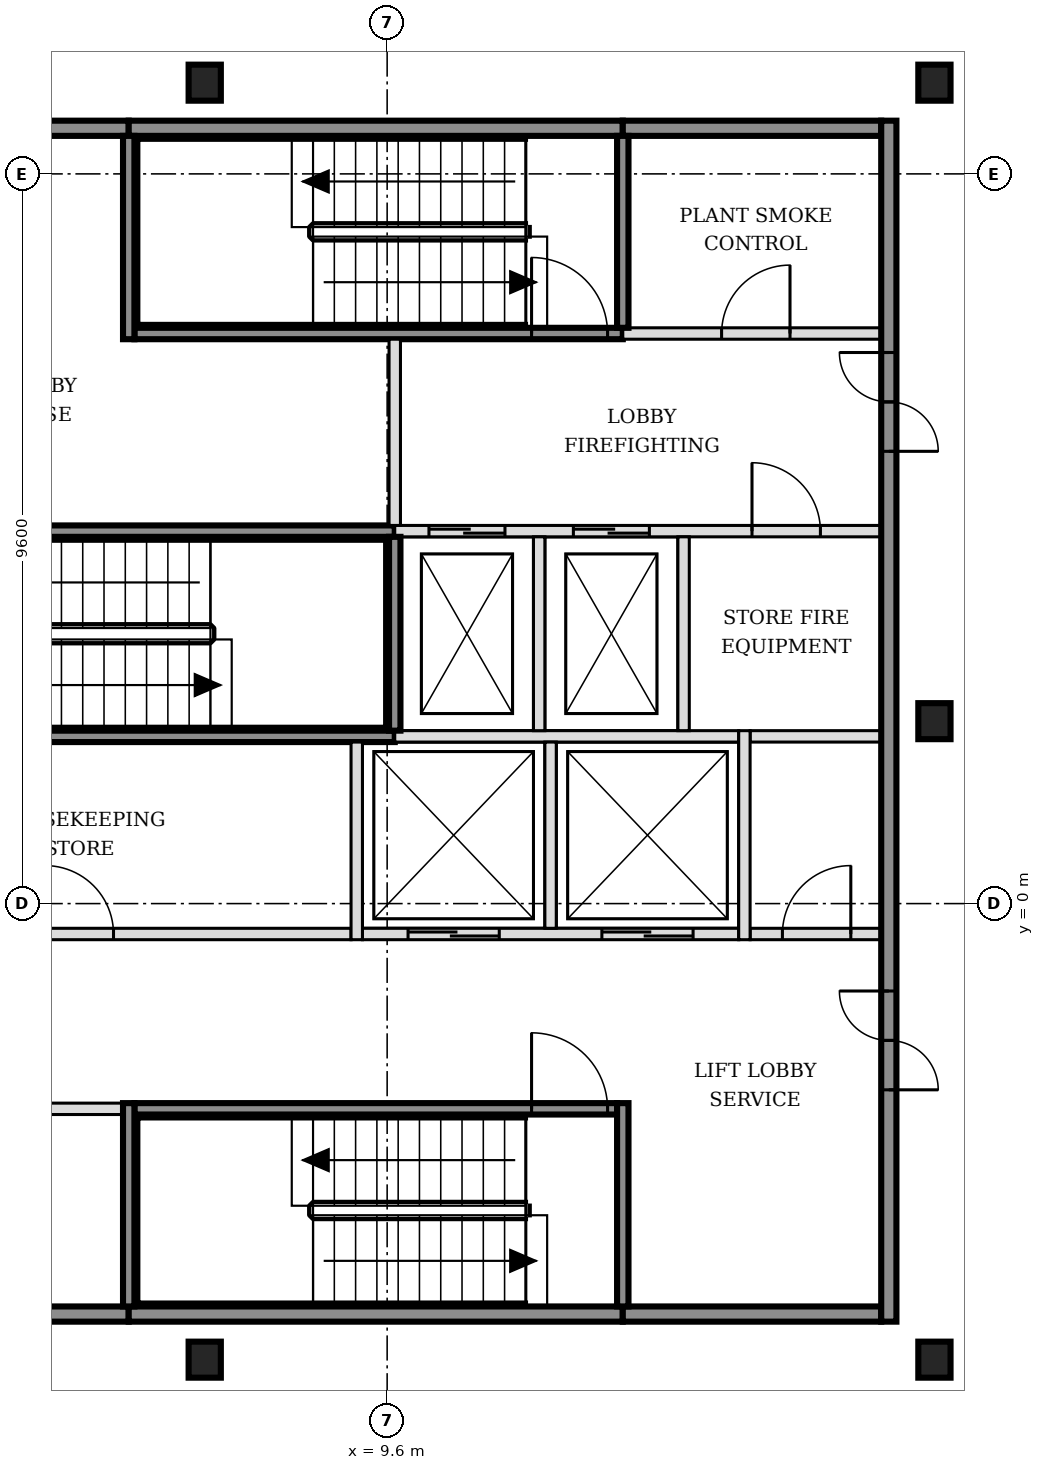
"""IFC4 building model, lengths in metres.
Left out: names, types, materials, properties, quantities, classifications, styles, units other than length and angle.
Written with IfcOpenShell. Run it as: python <this file> out.ifc"""

import sys

from ifc_helpers import new_model, si_unit, direction, frame, frame_2d, origin, origin_2d, place, context, subcontext, project, spatial, rectangle, i_section, extrude, element, fill, save


model = new_model("IFC4")
c1 = context("Model", 3, precision=1e-05, world=origin(), true_north=direction((0.0, 1.0)))
c2 = subcontext(c1, "Body", "Model", "MODEL_VIEW")
j1 = project(units=[si_unit("LENGTHUNIT", "METRE"), si_unit("PLANEANGLEUNIT", "RADIAN")], contexts=[c1])
p1 = place(None, origin())
s1 = spatial("IfcSite", under=j1, at=p1, CompositionType="ELEMENT")
p2 = place(p1, origin())
s2 = spatial("IfcBuilding", under=s1, at=p2, CompositionType="ELEMENT")
p3 = place(p2, frame((0.0, 0.0, 139.8)))
s3 = spatial("IfcBuildingStorey", under=s2, at=p3, CompositionType="ELEMENT", Elevation=139.8)
for number, where, z_axis, x_axis in (
    (1, (7.2, -6.0, -0.15), (0.0, 0.0, 1.0), (1.0, 0.0, 0.0)),
    (2, (16.8, -6.0, -0.15), (0.0, 0.0, 1.0), (1.0, 0.0, 0.0)),
    (3, (16.8, 2.4, -0.15), (0.0, 0.0, 1.0), (1.0, 0.0, 0.0)),
    (4, (7.2, 10.8, -0.15), (0.0, 0.0, 1.0), (1.0, 0.0, 0.0)),
    (5, (16.8, 10.8, -0.15), (0.0, 0.0, 1.0), (1.0, 0.0, 0.0)),
):
    element("IfcColumn", number, at=place(p3, frame(where, z_axis=z_axis, x_axis=x_axis)), inside=s3, PredefinedType="COLUMN", context=c2, shape_type="SweptSolid", body=[
        extrude(i_section(OverallWidth=0.424, OverallDepth=0.474, WebThickness=0.048, FlangeThickness=0.077, FilletRadius=0.015, at=origin_2d()), origin(), (0.0, 0.0, 1.0), 3.6),
    ])
p4 = place(p3, frame((-1.7, -5.4, 0.0), z_axis=(0.0, 0.0, 1.0), x_axis=(1.0, 0.0, 0.0)))
e6 = element("IfcWall", 6, at=p4, inside=s3, PredefinedType="SOLIDWALL", context=c2, shape_type="SweptSolid", body=[
    extrude(rectangle(XDim=7.9, YDim=0.2, at=frame_2d((3.95, 0.0))), origin(), (0.0, 0.0, 1.0), 3.45),
])
p5 = place(p3, frame((6.2, -5.4, 0.0), z_axis=(0.0, 0.0, 1.0), x_axis=(1.0, 0.0, 0.0)))
e7 = element("IfcWall", 7, at=p5, inside=s3, PredefinedType="SOLIDWALL", context=c2, shape_type="SweptSolid", body=[
    extrude(rectangle(XDim=6.5, YDim=0.2, at=frame_2d((3.25, 0.0))), origin(), (0.0, 0.0, 1.0), 3.45),
])
p6 = place(p3, frame((12.7, -5.4, 0.0), z_axis=(0.0, 0.0, 1.0), x_axis=(1.0, 0.0, 0.0)))
e8 = element("IfcWall", 8, at=p6, inside=s3, PredefinedType="SOLIDWALL", context=c2, shape_type="SweptSolid", body=[
    extrude(rectangle(XDim=3.4, YDim=0.2, at=frame_2d((1.7, 0.0))), origin(), (0.0, 0.0, 1.0), 3.45),
])
p7 = place(p3, frame((-1.7, -2.7, 0.0), z_axis=(0.0, 0.0, 1.0), x_axis=(1.0, 0.0, 0.0)))
e9 = element("IfcWall", 9, at=p7, inside=s3, PredefinedType="PARTITIONING", context=c2, shape_type="SweptSolid", body=[
    extrude(rectangle(XDim=7.825, YDim=0.15, at=frame_2d((3.913, 0.0))), origin(), (0.0, 0.0, 1.0), 3.45),
])
p8 = place(p7, frame((3.45, 0.0, 0.0)))
e10 = element("IfcOpeningElement", 10, at=p8, cuts=e9, PredefinedType="OPENING", context=c2, shape_type="SweptSolid", body=[
    extrude(rectangle(XDim=0.9, YDim=2.1, at=frame_2d((0.45, 1.05))), frame((0.0, 0.085, 0.0), z_axis=(0.0, -1.0, 0.0), x_axis=(1.0, 0.0, 0.0)), (0.0, 0.0, 1.0), 0.17),
])
p9 = place(p3, frame((6.275, -2.7, 0.0), z_axis=(0.0, 0.0, 1.0), x_axis=(1.0, 0.0, 0.0)))
e11 = element("IfcWall", 11, at=p9, inside=s3, PredefinedType="SOLIDWALL", context=c2, shape_type="SweptSolid", body=[
    extrude(rectangle(XDim=6.35, YDim=0.15, at=frame_2d((3.175, 0.0))), origin(), (0.0, 0.0, 1.0), 3.45),
])
p10 = place(p9, frame((5.225, 0.0, 0.0)))
e12 = element("IfcOpeningElement", 12, at=p10, cuts=e11, PredefinedType="OPENING", context=c2, shape_type="SweptSolid", body=[
    extrude(rectangle(XDim=1.0, YDim=2.1, at=frame_2d((0.5, 1.05))), frame((0.0, 0.085, 0.0), z_axis=(0.0, -1.0, 0.0), x_axis=(1.0, 0.0, 0.0)), (0.0, 0.0, 1.0), 0.17),
])
p11 = place(p3, frame((-1.7, -0.4, 0.0), z_axis=(0.0, 0.0, 1.0), x_axis=(1.0, 0.0, 0.0)))
e13 = element("IfcWall", 13, at=p11, inside=s3, PredefinedType="PARTITIONING", context=c2, shape_type="SweptSolid", body=[
    extrude(rectangle(XDim=10.825, YDim=0.15, at=frame_2d((5.413, 0.0))), origin(), (0.0, 0.0, 1.0), 3.45),
])
p12 = place(p11, frame((1.3, 0.0, 0.0)))
e14 = element("IfcOpeningElement", 14, at=p12, cuts=e13, PredefinedType="OPENING", context=c2, shape_type="SweptSolid", body=[
    extrude(rectangle(XDim=0.9, YDim=2.1, at=frame_2d((0.45, 1.05))), frame((0.0, 0.085, 0.0), z_axis=(0.0, -1.0, 0.0), x_axis=(1.0, 0.0, 0.0)), (0.0, 0.0, 1.0), 0.17),
])
p13 = place(p11, frame((6.8, 0.0, 0.0)))
e15 = element("IfcOpeningElement", 15, at=p13, cuts=e13, PredefinedType="OPENING", context=c2, shape_type="SweptSolid", body=[
    extrude(rectangle(XDim=0.9, YDim=2.1, at=frame_2d((0.45, 1.05))), frame((0.0, 0.085, 0.0), z_axis=(0.0, -1.0, 0.0), x_axis=(1.0, 0.0, 0.0)), (0.0, 0.0, 1.0), 0.17),
])
p14 = place(p3, frame((9.275, -0.4, 0.0), z_axis=(0.0, 0.0, 1.0), x_axis=(1.0, 0.0, 0.0)))
e16 = element("IfcWall", 16, at=p14, inside=s3, PredefinedType="SOLIDWALL", context=c2, shape_type="SweptSolid", body=[
    extrude(rectangle(XDim=4.95, YDim=0.15, at=frame_2d((2.475, 0.0))), origin(), (0.0, 0.0, 1.0), 3.45),
])
p15 = place(p14, frame((0.6, 0.0, 0.0)))
e17 = element("IfcOpeningElement", 17, at=p15, cuts=e16, PredefinedType="OPENING", context=c2, shape_type="SweptSolid", body=[
    extrude(rectangle(XDim=1.2, YDim=2.1, at=frame_2d((0.6, 1.05))), frame((0.0, 0.085, 0.0), z_axis=(0.0, -1.0, 0.0), x_axis=(1.0, 0.0, 0.0)), (0.0, 0.0, 1.0), 0.17),
])
p16 = place(p14, frame((3.15, 0.0, 0.0)))
e18 = element("IfcOpeningElement", 18, at=p16, cuts=e16, PredefinedType="OPENING", context=c2, shape_type="SweptSolid", body=[
    extrude(rectangle(XDim=1.2, YDim=2.1, at=frame_2d((0.6, 1.05))), frame((0.0, 0.085, 0.0), z_axis=(0.0, -1.0, 0.0), x_axis=(1.0, 0.0, 0.0)), (0.0, 0.0, 1.0), 0.17),
])
p17 = place(p3, frame((14.375, -0.4, 0.0), z_axis=(0.0, 0.0, 1.0), x_axis=(1.0, 0.0, 0.0)))
e19 = element("IfcWall", 19, at=p17, inside=s3, PredefinedType="PARTITIONING", context=c2, shape_type="SweptSolid", body=[
    extrude(rectangle(XDim=1.725, YDim=0.15, at=frame_2d((0.863, 0.0))), origin(), (0.0, 0.0, 1.0), 3.45),
])
p18 = place(p17, frame((0.425, 0.0, 0.0)))
e20 = element("IfcOpeningElement", 20, at=p18, cuts=e19, PredefinedType="OPENING", context=c2, shape_type="SweptSolid", body=[
    extrude(rectangle(XDim=0.9, YDim=2.1, at=frame_2d((0.45, 1.05))), frame((0.0, 0.085, 0.0), z_axis=(0.0, -1.0, 0.0), x_axis=(1.0, 0.0, 0.0)), (0.0, 0.0, 1.0), 0.17),
])
p19 = place(p3, frame((3.2, 2.2, 0.0), z_axis=(0.0, 0.0, 1.0), x_axis=(1.0, 0.0, 0.0)))
e21 = element("IfcWall", 21, at=p19, inside=s3, PredefinedType="SOLIDWALL", context=c2, shape_type="SweptSolid", body=[
    extrude(rectangle(XDim=6.5, YDim=0.15, at=frame_2d((3.25, 0.0))), origin(), (0.0, 0.0, 1.0), 3.45),
])
p20 = place(p3, frame((9.7, 2.2, 0.0), z_axis=(0.0, 0.0, 1.0), x_axis=(1.0, 0.0, 0.0)))
e22 = element("IfcWall", 22, at=p20, inside=s3, PredefinedType="SOLIDWALL", context=c2, shape_type="SweptSolid", body=[
    extrude(rectangle(XDim=4.525, YDim=0.15, at=frame_2d((2.263, 0.0))), origin(), (0.0, 0.0, 1.0), 3.45),
])
p21 = place(p3, frame((14.375, 2.2, 0.0), z_axis=(0.0, 0.0, 1.0), x_axis=(1.0, 0.0, 0.0)))
e23 = element("IfcWall", 23, at=p21, inside=s3, PredefinedType="PARTITIONING", context=c2, shape_type="SweptSolid", body=[
    extrude(rectangle(XDim=1.725, YDim=0.15, at=frame_2d((0.863, 0.0))), origin(), (0.0, 0.0, 1.0), 3.45),
])
p22 = place(p3, frame((3.2, 4.9, 0.0), z_axis=(0.0, 0.0, 1.0), x_axis=(1.0, 0.0, 0.0)))
e24 = element("IfcWall", 24, at=p22, inside=s3, PredefinedType="SOLIDWALL", context=c2, shape_type="SweptSolid", body=[
    extrude(rectangle(XDim=6.5, YDim=0.15, at=frame_2d((3.25, 0.0))), origin(), (0.0, 0.0, 1.0), 3.45),
])
p23 = place(p22, frame((0.175, 0.0, 0.0)))
e25 = element("IfcOpeningElement", 25, at=p23, cuts=e24, PredefinedType="OPENING", context=c2, shape_type="SweptSolid", body=[
    extrude(rectangle(XDim=1.0, YDim=2.1, at=frame_2d((0.5, 1.05))), frame((0.0, 0.085, 0.0), z_axis=(0.0, -1.0, 0.0), x_axis=(1.0, 0.0, 0.0)), (0.0, 0.0, 1.0), 0.17),
])
p24 = place(p3, frame((9.7, 4.9, 0.0), z_axis=(0.0, 0.0, 1.0), x_axis=(1.0, 0.0, 0.0)))
e26 = element("IfcWall", 26, at=p24, inside=s3, PredefinedType="SOLIDWALL", context=c2, shape_type="SweptSolid", body=[
    extrude(rectangle(XDim=6.4, YDim=0.15, at=frame_2d((3.2, 0.0))), origin(), (0.0, 0.0, 1.0), 3.45),
])
p25 = place(p24, frame((0.45, 0.0, 0.0)))
e27 = element("IfcOpeningElement", 27, at=p25, cuts=e26, PredefinedType="OPENING", context=c2, shape_type="SweptSolid", body=[
    extrude(rectangle(XDim=1.0, YDim=2.1, at=frame_2d((0.5, 1.05))), frame((0.0, 0.085, 0.0), z_axis=(0.0, -1.0, 0.0), x_axis=(1.0, 0.0, 0.0)), (0.0, 0.0, 1.0), 0.17),
])
p26 = place(p24, frame((2.35, 0.0, 0.0)))
e28 = element("IfcOpeningElement", 28, at=p26, cuts=e26, PredefinedType="OPENING", context=c2, shape_type="SweptSolid", body=[
    extrude(rectangle(XDim=1.0, YDim=2.1, at=frame_2d((0.5, 1.05))), frame((0.0, 0.085, 0.0), z_axis=(0.0, -1.0, 0.0), x_axis=(1.0, 0.0, 0.0)), (0.0, 0.0, 1.0), 0.17),
])
p27 = place(p24, frame((4.7, 0.0, 0.0)))
e29 = element("IfcOpeningElement", 29, at=p27, cuts=e26, PredefinedType="OPENING", context=c2, shape_type="SweptSolid", body=[
    extrude(rectangle(XDim=0.9, YDim=2.1, at=frame_2d((0.45, 1.05))), frame((0.0, 0.085, 0.0), z_axis=(0.0, -1.0, 0.0), x_axis=(1.0, 0.0, 0.0)), (0.0, 0.0, 1.0), 0.17),
])
p28 = place(p3, frame((6.275, 7.5, 0.0), z_axis=(0.0, 0.0, 1.0), x_axis=(1.0, 0.0, 0.0)))
e30 = element("IfcWall", 30, at=p28, inside=s3, PredefinedType="SOLIDWALL", context=c2, shape_type="SweptSolid", body=[
    extrude(rectangle(XDim=6.425, YDim=0.15, at=frame_2d((3.212, 0.0))), origin(), (0.0, 0.0, 1.0), 3.45),
])
p29 = place(p28, frame((5.225, 0.0, 0.0)))
e31 = element("IfcOpeningElement", 31, at=p29, cuts=e30, PredefinedType="OPENING", context=c2, shape_type="SweptSolid", body=[
    extrude(rectangle(XDim=1.0, YDim=2.1, at=frame_2d((0.5, 1.05))), frame((0.0, 0.085, 0.0), z_axis=(0.0, -1.0, 0.0), x_axis=(1.0, 0.0, 0.0)), (0.0, 0.0, 1.0), 0.17),
])
p30 = place(p3, frame((12.7, 7.5, 0.0), z_axis=(0.0, 0.0, 1.0), x_axis=(1.0, 0.0, 0.0)))
e32 = element("IfcWall", 32, at=p30, inside=s3, PredefinedType="SOLIDWALL", context=c2, shape_type="SweptSolid", body=[
    extrude(rectangle(XDim=3.4, YDim=0.15, at=frame_2d((1.7, 0.0))), origin(), (0.0, 0.0, 1.0), 3.45),
])
p31 = place(p30, frame((1.3, 0.0, 0.0)))
e33 = element("IfcOpeningElement", 33, at=p31, cuts=e32, PredefinedType="OPENING", context=c2, shape_type="SweptSolid", body=[
    extrude(rectangle(XDim=0.9, YDim=2.1, at=frame_2d((0.45, 1.05))), frame((0.0, 0.085, 0.0), z_axis=(0.0, -1.0, 0.0), x_axis=(1.0, 0.0, 0.0)), (0.0, 0.0, 1.0), 0.17),
])
p32 = place(p3, frame((-1.7, 10.2, 0.0), z_axis=(0.0, 0.0, 1.0), x_axis=(1.0, 0.0, 0.0)))
e34 = element("IfcWall", 34, at=p32, inside=s3, PredefinedType="SOLIDWALL", context=c2, shape_type="SweptSolid", body=[
    extrude(rectangle(XDim=7.9, YDim=0.2, at=frame_2d((3.95, 0.0))), origin(), (0.0, 0.0, 1.0), 3.45),
])
p33 = place(p3, frame((6.2, 10.2, 0.0), z_axis=(0.0, 0.0, 1.0), x_axis=(1.0, 0.0, 0.0)))
e35 = element("IfcWall", 35, at=p33, inside=s3, PredefinedType="SOLIDWALL", context=c2, shape_type="SweptSolid", body=[
    extrude(rectangle(XDim=6.5, YDim=0.2, at=frame_2d((3.25, 0.0))), origin(), (0.0, 0.0, 1.0), 3.45),
])
p34 = place(p3, frame((12.7, 10.2, 0.0), z_axis=(0.0, 0.0, 1.0), x_axis=(1.0, 0.0, 0.0)))
e36 = element("IfcWall", 36, at=p34, inside=s3, PredefinedType="SOLIDWALL", context=c2, shape_type="SweptSolid", body=[
    extrude(rectangle(XDim=3.4, YDim=0.2, at=frame_2d((1.7, 0.0))), origin(), (0.0, 0.0, 1.0), 3.45),
])
for number, where, z_axis, x_axis in (
    (37, (6.2, -5.3, 0.0), (0.0, 0.0, 1.0), (0.0, 1.0, 0.0)),
    (38, (6.2, 7.425, 0.0), (0.0, 0.0, 1.0), (0.0, 1.0, 0.0)),
):
    element("IfcWall", number, at=place(p3, frame(where, z_axis=z_axis, x_axis=x_axis)), inside=s3, PredefinedType="SOLIDWALL", context=c2, shape_type="SweptSolid", body=[
        extrude(rectangle(XDim=2.675, YDim=0.15, at=frame_2d((1.337, 0.0))), origin(), (0.0, 0.0, 1.0), 3.45),
    ])
p35 = place(p3, frame((9.2, -0.475, 0.0), z_axis=(0.0, 0.0, 1.0), x_axis=(0.0, 1.0, 0.0)))
e39 = element("IfcWall", 39, at=p35, inside=s3, PredefinedType="SOLIDWALL", context=c2, shape_type="SweptSolid", body=[
    extrude(rectangle(XDim=2.6, YDim=0.15, at=frame_2d((1.3, 0.0))), origin(), (0.0, 0.0, 1.0), 3.45),
])
p36 = place(p3, frame((9.7, 2.275, 0.0), z_axis=(0.0, 0.0, 1.0), x_axis=(0.0, 1.0, 0.0)))
e40 = element("IfcWall", 40, at=p36, inside=s3, PredefinedType="SOLIDWALL", context=c2, shape_type="SweptSolid", body=[
    extrude(rectangle(XDim=2.55, YDim=0.15, at=frame_2d((1.275, 0.0))), origin(), (0.0, 0.0, 1.0), 3.45),
])
p37 = place(p3, frame((9.7, 4.975, 0.0), z_axis=(0.0, 0.0, 1.0), x_axis=(0.0, 1.0, 0.0)))
e41 = element("IfcWall", 41, at=p37, inside=s3, PredefinedType="SOLIDWALL", context=c2, shape_type="SweptSolid", body=[
    extrude(rectangle(XDim=2.45, YDim=0.15, at=frame_2d((1.225, 0.0))), origin(), (0.0, 0.0, 1.0), 3.45),
])
p38 = place(p3, frame((11.6, 2.275, 0.0), z_axis=(0.0, 0.0, 1.0), x_axis=(0.0, 1.0, 0.0)))
e42 = element("IfcWall", 42, at=p38, inside=s3, PredefinedType="SOLIDWALL", context=c2, shape_type="SweptSolid", body=[
    extrude(rectangle(XDim=2.55, YDim=0.15, at=frame_2d((1.275, 0.0))), origin(), (0.0, 0.0, 1.0), 3.45),
])
p39 = place(p3, frame((11.75, -0.325, 0.0), z_axis=(0.0, 0.0, 1.0), x_axis=(0.0, 1.0, 0.0)))
e43 = element("IfcWall", 43, at=p39, inside=s3, PredefinedType="SOLIDWALL", context=c2, shape_type="SweptSolid", body=[
    extrude(rectangle(XDim=2.45, YDim=0.15, at=frame_2d((1.225, 0.0))), origin(), (0.0, 0.0, 1.0), 3.45),
])
p40 = place(p3, frame((12.7, -5.3, 0.0), z_axis=(0.0, 0.0, 1.0), x_axis=(0.0, 1.0, 0.0)))
e44 = element("IfcWall", 44, at=p40, inside=s3, PredefinedType="SOLIDWALL", context=c2, shape_type="SweptSolid", body=[
    extrude(rectangle(XDim=2.675, YDim=0.15, at=frame_2d((1.337, 0.0))), origin(), (0.0, 0.0, 1.0), 3.45),
])
p41 = place(p3, frame((12.7, 7.575, 0.0), z_axis=(0.0, 0.0, 1.0), x_axis=(0.0, 1.0, 0.0)))
e45 = element("IfcWall", 45, at=p41, inside=s3, PredefinedType="SOLIDWALL", context=c2, shape_type="SweptSolid", body=[
    extrude(rectangle(XDim=2.525, YDim=0.15, at=frame_2d((1.263, 0.0))), origin(), (0.0, 0.0, 1.0), 3.45),
])
p42 = place(p3, frame((13.5, 2.275, 0.0), z_axis=(0.0, 0.0, 1.0), x_axis=(0.0, 1.0, 0.0)))
e46 = element("IfcWall", 46, at=p42, inside=s3, PredefinedType="SOLIDWALL", context=c2, shape_type="SweptSolid", body=[
    extrude(rectangle(XDim=2.55, YDim=0.15, at=frame_2d((1.275, 0.0))), origin(), (0.0, 0.0, 1.0), 3.45),
])
p43 = place(p3, frame((14.3, -0.475, 0.0), z_axis=(0.0, 0.0, 1.0), x_axis=(0.0, 1.0, 0.0)))
e47 = element("IfcWall", 47, at=p43, inside=s3, PredefinedType="SOLIDWALL", context=c2, shape_type="SweptSolid", body=[
    extrude(rectangle(XDim=2.75, YDim=0.15, at=frame_2d((1.375, 0.0))), origin(), (0.0, 0.0, 1.0), 3.45),
])
p44 = place(p3, frame((16.2, -5.5, 0.0), z_axis=(0.0, 0.0, 1.0), x_axis=(0.0, 1.0, 0.0)))
e48 = element("IfcWall", 48, at=p44, inside=s3, PredefinedType="SOLIDWALL", context=c2, shape_type="SweptSolid", body=[
    extrude(rectangle(XDim=15.8, YDim=0.2, at=frame_2d((7.9, 0.0))), origin(), (0.0, 0.0, 1.0), 3.45),
])
p45 = place(p44, frame((3.05, 0.0, 0.0)))
e49 = element("IfcOpeningElement", 49, at=p45, cuts=e48, PredefinedType="OPENING", context=c2, shape_type="SweptSolid", body=[
    extrude(rectangle(XDim=1.3, YDim=2.1, at=frame_2d((0.65, 1.05))), frame((0.0, 0.11, 0.0), z_axis=(0.0, -1.0, 0.0), x_axis=(1.0, 0.0, 0.0)), (0.0, 0.0, 1.0), 0.22),
])
p46 = place(p44, frame((11.45, 0.0, 0.0)))
e50 = element("IfcOpeningElement", 50, at=p46, cuts=e48, PredefinedType="OPENING", context=c2, shape_type="SweptSolid", body=[
    extrude(rectangle(XDim=1.3, YDim=2.1, at=frame_2d((0.65, 1.05))), frame((0.0, 0.11, 0.0), z_axis=(0.0, -1.0, 0.0), x_axis=(1.0, 0.0, 0.0)), (0.0, 0.0, 1.0), 0.22),
])
p47 = place(p15, origin())
e51 = element("IfcDoor", 51, at=p47, inside=s3, OperationType="DOUBLE_DOOR_SLIDING", PredefinedType="DOOR", context=c2, shape_type="SweptSolid", body=[
    extrude(rectangle(XDim=1.2, YDim=2.1, at=frame_2d((0.6, 1.05))), frame((0.0, 0.025, 0.0), z_axis=(0.0, -1.0, 0.0), x_axis=(1.0, 0.0, 0.0)), (0.0, 0.0, 1.0), 0.05),
])
fill(e17, e51)
p48 = place(p16, origin())
e52 = element("IfcDoor", 52, at=p48, inside=s3, OperationType="DOUBLE_DOOR_SLIDING", PredefinedType="DOOR", context=c2, shape_type="SweptSolid", body=[
    extrude(rectangle(XDim=1.2, YDim=2.1, at=frame_2d((0.6, 1.05))), frame((0.0, 0.025, 0.0), z_axis=(0.0, -1.0, 0.0), x_axis=(1.0, 0.0, 0.0)), (0.0, 0.0, 1.0), 0.05),
])
fill(e18, e52)
p49 = place(p25, origin())
e53 = element("IfcDoor", 53, at=p49, inside=s3, OperationType="DOUBLE_DOOR_SLIDING", PredefinedType="DOOR", context=c2, shape_type="SweptSolid", body=[
    extrude(rectangle(XDim=1.0, YDim=2.1, at=frame_2d((0.5, 1.05))), frame((0.0, 0.025, 0.0), z_axis=(0.0, -1.0, 0.0), x_axis=(1.0, 0.0, 0.0)), (0.0, 0.0, 1.0), 0.05),
])
fill(e27, e53)
p50 = place(p26, origin())
e54 = element("IfcDoor", 54, at=p50, inside=s3, OperationType="DOUBLE_DOOR_SLIDING", PredefinedType="DOOR", context=c2, shape_type="SweptSolid", body=[
    extrude(rectangle(XDim=1.0, YDim=2.1, at=frame_2d((0.5, 1.05))), frame((0.0, 0.025, 0.0), z_axis=(0.0, -1.0, 0.0), x_axis=(1.0, 0.0, 0.0)), (0.0, 0.0, 1.0), 0.05),
])
fill(e28, e54)
p51 = place(p10, origin())
e55 = element("IfcDoor", 55, at=p51, inside=s3, OperationType="SINGLE_SWING_LEFT", PredefinedType="DOOR", context=c2, shape_type="SweptSolid", body=[
    extrude(rectangle(XDim=1.0, YDim=2.1, at=frame_2d((0.5, 1.05))), frame((0.0, 0.025, 0.0), z_axis=(0.0, -1.0, 0.0), x_axis=(1.0, 0.0, 0.0)), (0.0, 0.0, 1.0), 0.05),
])
fill(e12, e55)
p52 = place(p29, origin())
e56 = element("IfcDoor", 56, at=p52, inside=s3, OperationType="SINGLE_SWING_LEFT", PredefinedType="DOOR", context=c2, shape_type="SweptSolid", body=[
    extrude(rectangle(XDim=1.0, YDim=2.1, at=frame_2d((0.5, 1.05))), frame((0.0, 0.025, 0.0), z_axis=(0.0, -1.0, 0.0), x_axis=(1.0, 0.0, 0.0)), (0.0, 0.0, 1.0), 0.05),
])
fill(e31, e56)
p53 = place(p45, origin())
e57 = element("IfcDoor", 57, at=p53, inside=s3, OperationType="DOUBLE_DOOR_SINGLE_SWING", PredefinedType="DOOR", context=c2, shape_type="SweptSolid", body=[
    extrude(rectangle(XDim=1.3, YDim=2.1, at=frame_2d((0.65, 1.05))), frame((0.0, 0.025, 0.0), z_axis=(0.0, -1.0, 0.0), x_axis=(1.0, 0.0, 0.0)), (0.0, 0.0, 1.0), 0.05),
])
fill(e49, e57)
p54 = place(p46, origin())
e58 = element("IfcDoor", 58, at=p54, inside=s3, OperationType="DOUBLE_DOOR_SINGLE_SWING", PredefinedType="DOOR", context=c2, shape_type="SweptSolid", body=[
    extrude(rectangle(XDim=1.3, YDim=2.1, at=frame_2d((0.65, 1.05))), frame((0.0, 0.025, 0.0), z_axis=(0.0, -1.0, 0.0), x_axis=(1.0, 0.0, 0.0)), (0.0, 0.0, 1.0), 0.05),
])
fill(e50, e58)
p55 = place(p18, origin())
e59 = element("IfcDoor", 59, at=p55, inside=s3, OperationType="SINGLE_SWING_RIGHT", PredefinedType="DOOR", context=c2, shape_type="SweptSolid", body=[
    extrude(rectangle(XDim=0.9, YDim=2.1, at=frame_2d((0.45, 1.05))), frame((0.0, 0.025, 0.0), z_axis=(0.0, -1.0, 0.0), x_axis=(1.0, 0.0, 0.0)), (0.0, 0.0, 1.0), 0.05),
])
fill(e20, e59)
p56 = place(p27, origin())
e60 = element("IfcDoor", 60, at=p56, inside=s3, OperationType="SINGLE_SWING_LEFT", PredefinedType="DOOR", context=c2, shape_type="SweptSolid", body=[
    extrude(rectangle(XDim=0.9, YDim=2.1, at=frame_2d((0.45, 1.05))), frame((0.0, 0.025, 0.0), z_axis=(0.0, -1.0, 0.0), x_axis=(1.0, 0.0, 0.0)), (0.0, 0.0, 1.0), 0.05),
])
fill(e29, e60)
p57 = place(p31, origin())
e61 = element("IfcDoor", 61, at=p57, inside=s3, OperationType="SINGLE_SWING_RIGHT", PredefinedType="DOOR", context=c2, shape_type="SweptSolid", body=[
    extrude(rectangle(XDim=0.9, YDim=2.1, at=frame_2d((0.45, 1.05))), frame((0.0, 0.025, 0.0), z_axis=(0.0, -1.0, 0.0), x_axis=(1.0, 0.0, 0.0)), (0.0, 0.0, 1.0), 0.05),
])
fill(e33, e61)
p58 = place(p13, origin())
e62 = element("IfcDoor", 62, at=p58, inside=s3, OperationType="SINGLE_SWING_LEFT", PredefinedType="DOOR", context=c2, shape_type="SweptSolid", body=[
    extrude(rectangle(XDim=0.9, YDim=2.1, at=frame_2d((0.45, 1.05))), frame((0.0, 0.025, 0.0), z_axis=(0.0, -1.0, 0.0), x_axis=(1.0, 0.0, 0.0)), (0.0, 0.0, 1.0), 0.05),
])
fill(e15, e62)
save(model, sys.argv[1])
